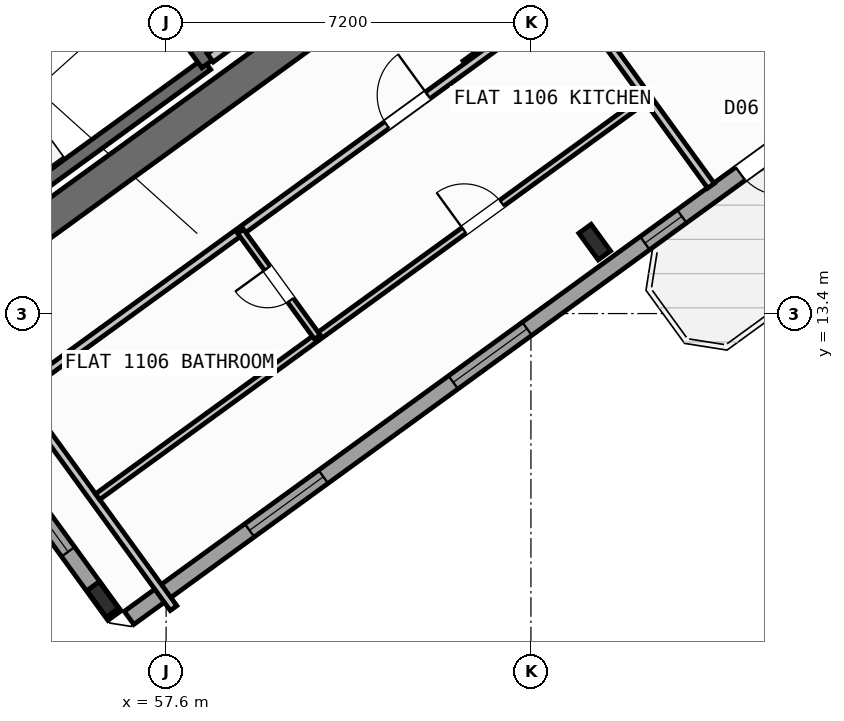
"""IFC4 building model, lengths in metres.
Left out: names, types, materials, properties, quantities, classifications, styles, units other than length and angle.
Written with IfcOpenShell. Run it as: python <this file> out.ifc"""

import sys

from ifc_helpers import new_model, si_unit, direction, frame, frame_2d, origin, origin_2d, place, context, subcontext, project, spatial, rectangle, i_section, extrude, source, transform, mapped, element, fill, save


model = new_model("IFC4")
c1 = context("Model", 3, precision=1e-05, world=origin(), true_north=direction((0.0, 1.0)))
c2 = subcontext(c1, "Body", "Model", "MODEL_VIEW")
j1 = project(units=[si_unit("LENGTHUNIT", "METRE"), si_unit("PLANEANGLEUNIT", "RADIAN")], contexts=[c1])
p1 = place(None, origin())
s1 = spatial("IfcSite", under=j1, at=p1, CompositionType="ELEMENT")
p2 = place(p1, origin())
s2 = spatial("IfcBuilding", under=s1, at=p2, CompositionType="ELEMENT")
p3 = place(p2, frame((0.0, 0.0, 45.6)))
s3 = spatial("IfcBuildingStorey", under=s2, at=p3, CompositionType="ELEMENT", Elevation=45.6)
p4 = place(p3, frame((52.318, 13.11, 0.0), z_axis=(0.0, 0.0, 1.0), x_axis=(0.809019445368, 0.587781878776, 0.0)))
e1 = element("IfcWall", 1, at=p4, inside=s3, PredefinedType="SHEAR", context=c2, shape_type="SweptSolid", body=[
    extrude(rectangle(XDim=12.44, YDim=0.65, at=frame_2d((6.22, 0.0))), origin(), (0.0, 0.0, 1.0), 3.35),
])
m1 = source(origin(), c2, "Body", "SweptSolid", [
    extrude(i_section(OverallWidth=0.3, OverallDepth=0.65, WebThickness=0.016, FlangeThickness=0.031, at=origin_2d()), origin(), (0.0, 0.0, 1.0), 3.6),
])
for number, where, z_axis, x_axis in (
    (2, (56.35, 7.758, 0.0), (0.0, 0.0, 1.0), (0.809, 0.588, 0.0)),
    (3, (66.058, 14.811, 0.0), (0.0, 0.0, 1.0), (0.809, 0.588, 0.0)),
):
    element("IfcColumn", number, at=place(p3, frame(where, z_axis=z_axis, x_axis=x_axis)), inside=s3, PredefinedType="COLUMN", context=c2, shape_type="MappedRepresentation", body=[
        mapped(m1, transform((0.0, 0.0, 0.0), scale=1.0)),
    ])
p5 = place(p3, frame((58.455, 35.484, 0.0), z_axis=(0.0, 0.0, 1.0), x_axis=(0.587783625747, -0.809018176127, 0.0)))
e4 = element("IfcWall", 4, at=p5, inside=s3, PredefinedType="STANDARD", context=c2, shape_type="SweptSolid", body=[
    extrude(rectangle(XDim=21.587, YDim=0.32, at=frame_2d((10.794, 0.0))), origin(), (0.0, 0.0, 1.0), 2.725),
])
p6 = place(p5, frame((1.5, 0.0, 0.8)))
e5 = element("IfcOpeningElement", 5, at=p6, cuts=e4, PredefinedType="OPENING", context=c2, shape_type="SweptSolid", body=[
    extrude(rectangle(XDim=2.1, YDim=1.55, at=frame_2d((1.05, 0.775))), frame((0.0, 0.17, 0.0), z_axis=(0.0, -1.0, 0.0), x_axis=(1.0, 0.0, 0.0)), (0.0, 0.0, 1.0), 0.34),
])
p7 = place(p5, frame((5.105, 0.0, 0.85)))
e6 = element("IfcOpeningElement", 6, at=p7, cuts=e4, PredefinedType="OPENING", context=c2, shape_type="SweptSolid", body=[
    extrude(rectangle(XDim=1.5, YDim=1.5, at=frame_2d((0.75, 0.75))), frame((0.0, 0.17, 0.0), z_axis=(0.0, -1.0, 0.0), x_axis=(1.0, 0.0, 0.0)), (0.0, 0.0, 1.0), 0.34),
])
p8 = place(p5, frame((8.954, 0.0, 0.85)))
e7 = element("IfcOpeningElement", 7, at=p8, cuts=e4, PredefinedType="OPENING", context=c2, shape_type="SweptSolid", body=[
    extrude(rectangle(XDim=1.5, YDim=1.5, at=frame_2d((0.75, 0.75))), frame((0.0, 0.17, 0.0), z_axis=(0.0, -1.0, 0.0), x_axis=(1.0, 0.0, 0.0)), (0.0, 0.0, 1.0), 0.34),
])
p9 = place(p5, frame((17.581, 0.0, 0.95)))
e8 = element("IfcOpeningElement", 8, at=p9, cuts=e4, PredefinedType="OPENING", context=c2, shape_type="SweptSolid", body=[
    extrude(rectangle(XDim=1.2, YDim=1.4, at=frame_2d((0.6, 0.7))), frame((0.0, 0.17, 0.0), z_axis=(0.0, -1.0, 0.0), x_axis=(1.0, 0.0, 0.0)), (0.0, 0.0, 1.0), 0.34),
])
p10 = place(p3, frame((71.098, 17.731, 0.0), z_axis=(0.0, 0.0, 1.0), x_axis=(-0.809021120468, -0.587779573171, 0.0)))
e9 = element("IfcWall", 9, at=p10, inside=s3, PredefinedType="STANDARD", context=c2, shape_type="SweptSolid", body=[
    extrude(rectangle(XDim=17.588, YDim=0.32, at=frame_2d((8.794, 0.0))), origin(), (0.0, 0.0, 1.0), 3.35),
])
p11 = place(p10, frame((1.624, 0.0, 0.0)))
e10 = element("IfcOpeningElement", 10, at=p11, cuts=e9, PredefinedType="OPENING", context=c2, shape_type="SweptSolid", body=[
    extrude(rectangle(XDim=1.05, YDim=2.15, at=frame_2d((0.525, 1.075))), frame((0.0, 0.17, 0.0), z_axis=(0.0, -1.0, 0.0), x_axis=(1.0, 0.0, 0.0)), (0.0, 0.0, 1.0), 0.34),
])
p12 = place(p10, frame((4.104, 0.0, 1.0)))
e11 = element("IfcOpeningElement", 11, at=p12, cuts=e9, PredefinedType="OPENING", context=c2, shape_type="SweptSolid", body=[
    extrude(rectangle(XDim=0.9, YDim=1.25, at=frame_2d((0.45, 0.625))), frame((0.0, 0.17, 0.0), z_axis=(0.0, -1.0, 0.0), x_axis=(1.0, 0.0, 0.0)), (0.0, 0.0, 1.0), 0.34),
])
p13 = place(p10, frame((7.879, 0.0, 0.85)))
e12 = element("IfcOpeningElement", 12, at=p13, cuts=e9, PredefinedType="OPENING", context=c2, shape_type="SweptSolid", body=[
    extrude(rectangle(XDim=1.8, YDim=1.5, at=frame_2d((0.9, 0.75))), frame((0.0, 0.17, 0.0), z_axis=(0.0, -1.0, 0.0), x_axis=(1.0, 0.0, 0.0)), (0.0, 0.0, 1.0), 0.34),
])
p14 = place(p10, frame((12.849, 0.0, 0.85)))
e13 = element("IfcOpeningElement", 13, at=p14, cuts=e9, PredefinedType="OPENING", context=c2, shape_type="SweptSolid", body=[
    extrude(rectangle(XDim=1.8, YDim=1.5, at=frame_2d((0.9, 0.75))), frame((0.0, 0.17, 0.0), z_axis=(0.0, -1.0, 0.0), x_axis=(1.0, 0.0, 0.0)), (0.0, 0.0, 1.0), 0.34),
])
p15 = place(p3, frame((56.581, 7.439, 0.0), z_axis=(0.0, 0.0, 1.0), x_axis=(-0.587785875463, 0.809016541614, 0.0)))
e14 = element("IfcWall", 14, at=p15, inside=s3, PredefinedType="STANDARD", context=c2, shape_type="SweptSolid", body=[
    extrude(rectangle(XDim=6.774, YDim=0.32, at=frame_2d((3.387, 0.0))), origin(), (0.0, 0.0, 1.0), 2.725),
])
p16 = place(p15, frame((1.556, 0.0, 0.8)))
e15 = element("IfcOpeningElement", 15, at=p16, cuts=e14, PredefinedType="OPENING", context=c2, shape_type="SweptSolid", body=[
    extrude(rectangle(XDim=2.1, YDim=1.55, at=frame_2d((1.05, 0.775))), frame((0.0, 0.17, 0.0), z_axis=(0.0, -1.0, 0.0), x_axis=(1.0, 0.0, 0.0)), (0.0, 0.0, 1.0), 0.34),
])
p17 = place(p3, frame((52.472, 14.013, 0.0), z_axis=(0.0, 0.0, 1.0), x_axis=(0.809028366311, 0.587769599847, 0.0)))
e16 = element("IfcWall", 16, at=p17, inside=s3, PredefinedType="SHEAR", context=c2, shape_type="SweptSolid", body=[
    extrude(rectangle(XDim=7.33, YDim=0.26, at=frame_2d((3.665, 0.0))), origin(), (0.0, 0.0, 1.0), 3.35),
])
p18 = place(p3, frame((50.615, 16.57, 0.0), z_axis=(0.0, 0.0, 1.0), x_axis=(0.809028366311, 0.587769599847, 0.0)))
e17 = element("IfcWall", 17, at=p18, inside=s3, PredefinedType="SHEAR", context=c2, shape_type="SweptSolid", body=[
    extrude(rectangle(XDim=7.33, YDim=0.26, at=frame_2d((3.665, 0.0))), origin(), (0.0, 0.0, 1.0), 3.35),
])
p19 = place(p18, frame((0.22, 0.0, 0.0)))
e18 = element("IfcOpeningElement", 18, at=p19, cuts=e17, PredefinedType="OPENING", context=c2, shape_type="SweptSolid", body=[
    extrude(rectangle(XDim=1.1, YDim=2.1, at=frame_2d((0.55, 1.05))), frame((0.0, 0.14, 0.0), z_axis=(0.0, -1.0, 0.0), x_axis=(1.0, 0.0, 0.0)), (0.0, 0.0, 1.0), 0.28),
])
p20 = place(p3, frame((58.41, 18.327, 0.0), z_axis=(0.0, 0.0, 1.0), x_axis=(-0.58776738483, 0.809029975545, 0.0)))
e19 = element("IfcWall", 19, at=p20, inside=s3, PredefinedType="SHEAR", context=c2, shape_type="SweptSolid", body=[
    extrude(rectangle(XDim=3.16, YDim=0.26, at=frame_2d((1.58, 0.0))), origin(), (0.0, 0.0, 1.0), 3.35),
])
p21 = place(p3, frame((58.472, 18.447, 0.0), z_axis=(0.0, 0.0, 1.0), x_axis=(0.809022487728, 0.587777691266, 0.0)))
e20 = element("IfcWall", 20, at=p21, inside=s3, PredefinedType="STANDARD", context=c2, shape_type="SweptSolid", body=[
    extrude(rectangle(XDim=3.648, YDim=0.2, at=frame_2d((1.824, 0.0))), origin(), (0.0, 0.0, 1.0), 3.34),
])
p22 = place(p3, frame((63.507, 18.322, 0.0), z_axis=(0.0, 0.0, 1.0), x_axis=(0.809034604122, 0.587761013791, 0.0)))
e21 = element("IfcWall", 21, at=p22, inside=s3, PredefinedType="PARTITIONING", context=c2, shape_type="SweptSolid", body=[
    extrude(rectangle(XDim=2.51, YDim=0.16, at=frame_2d((1.255, 0.0))), origin(), (0.0, 0.0, 1.0), 3.34),
])
p23 = place(p3, frame((68.353, 15.922, 0.0), z_axis=(0.0, 0.0, 1.0), x_axis=(-0.58776839458, 0.809029241952, 0.0)))
e22 = element("IfcWall", 22, at=p23, inside=s3, PredefinedType="PARTITIONING", context=c2, shape_type="SweptSolid", body=[
    extrude(rectangle(XDim=8.1, YDim=0.16, at=frame_2d((4.05, 0.0))), origin(), (0.0, 0.0, 1.0), 3.34),
])
p24 = place(p3, frame((53.705, 11.126, 0.0), z_axis=(0.0, 0.0, 1.0), x_axis=(0.809014504436, 0.587788679384, 0.0)))
e23 = element("IfcWall", 23, at=p24, inside=s3, PredefinedType="PARTITIONING", context=c2, shape_type="SweptSolid", body=[
    extrude(rectangle(XDim=14.67, YDim=0.16, at=frame_2d((7.335, 0.0))), origin(), (0.0, 0.0, 1.0), 3.34),
])
p25 = place(p24, frame((10.2, 0.0, 0.0)))
e24 = element("IfcOpeningElement", 24, at=p25, cuts=e23, PredefinedType="OPENING", context=c2, shape_type="SweptSolid", body=[
    extrude(rectangle(XDim=1.0, YDim=2.1, at=frame_2d((0.5, 1.05))), frame((0.0, 0.09, 0.0), z_axis=(0.0, -1.0, 0.0), x_axis=(1.0, 0.0, 0.0)), (0.0, 0.0, 1.0), 0.18),
])
p26 = place(p3, frame((57.747, 7.586, 0.0), z_axis=(0.0, 0.0, 1.0), x_axis=(-0.587784893399, 0.809017255126, 0.0)))
e25 = element("IfcWall", 25, at=p26, inside=s3, PredefinedType="PARTITIONING", context=c2, shape_type="SweptSolid", body=[
    extrude(rectangle(XDim=5.48, YDim=0.16, at=frame_2d((2.74, 0.0))), origin(), (0.0, 0.0, 1.0), 3.34),
])
p27 = place(p3, frame((56.249, 9.785, 0.0), z_axis=(0.0, 0.0, 1.0), x_axis=(0.809011747655, 0.587792473715, 0.0)))
e26 = element("IfcWall", 26, at=p27, inside=s3, PredefinedType="PLUMBINGWALL", context=c2, shape_type="SweptSolid", body=[
    extrude(rectangle(XDim=13.4, YDim=0.14, at=frame_2d((6.7, 0.0))), origin(), (0.0, 0.0, 1.0), 3.34),
])
p28 = place(p27, frame((8.94, 0.0, 0.0)))
e27 = element("IfcOpeningElement", 27, at=p28, cuts=e26, PredefinedType="OPENING", context=c2, shape_type="SweptSolid", body=[
    extrude(rectangle(XDim=0.92, YDim=2.08, at=frame_2d((0.46, 1.04))), frame((0.0, 0.08, 0.0), z_axis=(0.0, -1.0, 0.0), x_axis=(1.0, 0.0, 0.0)), (0.0, 0.0, 1.0), 0.16),
])
p29 = place(p3, frame((60.585, 12.936, 0.0), z_axis=(0.0, 0.0, 1.0), x_axis=(-0.587772116736, 0.809026537752, 0.0)))
e28 = element("IfcWall", 28, at=p29, inside=s3, PredefinedType="PLUMBINGWALL", context=c2, shape_type="SweptSolid", body=[
    extrude(rectangle(XDim=2.58, YDim=0.14, at=frame_2d((1.29, 0.0))), origin(), (0.0, 0.0, 1.0), 3.34),
])
p30 = place(p29, frame((0.9, 0.0, 0.0)))
e29 = element("IfcOpeningElement", 29, at=p30, cuts=e28, PredefinedType="OPENING", context=c2, shape_type="SweptSolid", body=[
    extrude(rectangle(XDim=0.78, YDim=2.05, at=frame_2d((0.39, 1.025))), frame((0.0, 0.08, 0.0), z_axis=(0.0, -1.0, 0.0), x_axis=(1.0, 0.0, 0.0)), (0.0, 0.0, 1.0), 0.16),
])
m2 = source(origin(), c2, "Body", "SweptSolid", [
    extrude(rectangle(XDim=1.05, YDim=2.15, at=frame_2d((0.525, 1.075))), frame((0.0, 0.025, 0.0), z_axis=(0.0, -1.0, 0.0), x_axis=(1.0, 0.0, 0.0)), (0.0, 0.0, 1.0), 0.05),
])
p31 = place(p11, origin())
e30 = element("IfcDoor", 30, at=p31, inside=s3, OperationType="SINGLE_SWING_LEFT", PredefinedType="DOOR", context=c2, shape_type="MappedRepresentation", body=[
    mapped(m2, transform((0.0, 0.0, 0.0), scale=1.0)),
])
fill(e10, e30)
m3 = source(origin(), c2, "Body", "SweptSolid", [
    extrude(rectangle(XDim=0.9, YDim=1.25, at=frame_2d((0.45, 0.625))), frame((0.0, 0.03, 0.0), z_axis=(0.0, -1.0, 0.0), x_axis=(1.0, 0.0, 0.0)), (0.0, 0.0, 1.0), 0.06),
])
p32 = place(p12, origin())
e31 = element("IfcWindow", 31, at=p32, inside=s3, PartitioningType="SINGLE_PANEL", PredefinedType="WINDOW", context=c2, shape_type="MappedRepresentation", body=[
    mapped(m3, transform((0.0, 0.0, 0.0), scale=1.0)),
])
fill(e11, e31)
m4 = source(origin(), c2, "Body", "SweptSolid", [
    extrude(rectangle(XDim=1.8, YDim=1.5, at=frame_2d((0.9, 0.75))), frame((0.0, 0.03, 0.0), z_axis=(0.0, -1.0, 0.0), x_axis=(1.0, 0.0, 0.0)), (0.0, 0.0, 1.0), 0.06),
])
p33 = place(p13, origin())
e32 = element("IfcWindow", 32, at=p33, inside=s3, PartitioningType="SINGLE_PANEL", PredefinedType="WINDOW", context=c2, shape_type="MappedRepresentation", body=[
    mapped(m4, transform((0.0, 0.0, 0.0), scale=1.0)),
])
fill(e12, e32)
p34 = place(p14, origin())
e33 = element("IfcWindow", 33, at=p34, inside=s3, PartitioningType="SINGLE_PANEL", PredefinedType="WINDOW", context=c2, shape_type="MappedRepresentation", body=[
    mapped(m4, transform((0.0, 0.0, 0.0), scale=1.0)),
])
fill(e13, e33)
m5 = source(origin(), c2, "Body", "SweptSolid", [
    extrude(rectangle(XDim=2.1, YDim=1.55, at=frame_2d((1.05, 0.775))), frame((0.0, 0.03, 0.0), z_axis=(0.0, -1.0, 0.0), x_axis=(1.0, 0.0, 0.0)), (0.0, 0.0, 1.0), 0.06),
])
p35 = place(p16, origin())
e34 = element("IfcWindow", 34, at=p35, inside=s3, PartitioningType="SINGLE_PANEL", PredefinedType="WINDOW", context=c2, shape_type="MappedRepresentation", body=[
    mapped(m5, transform((0.0, 0.0, 0.0), scale=1.0)),
])
fill(e15, e34)
m6 = source(origin(), c2, "Body", "SweptSolid", [
    extrude(rectangle(XDim=1.0, YDim=2.1, at=frame_2d((0.5, 1.05))), frame((0.0, 0.025, 0.0), z_axis=(0.0, -1.0, 0.0), x_axis=(1.0, 0.0, 0.0)), (0.0, 0.0, 1.0), 0.05),
])
p36 = place(p25, origin())
e35 = element("IfcDoor", 35, at=p36, inside=s3, OperationType="SINGLE_SWING_RIGHT", PredefinedType="DOOR", context=c2, shape_type="MappedRepresentation", body=[
    mapped(m6, transform((0.0, 0.0, 0.0), scale=1.0)),
])
fill(e24, e35)
m7 = source(origin(), c2, "Body", "SweptSolid", [
    extrude(rectangle(XDim=0.92, YDim=2.08, at=frame_2d((0.46, 1.04))), frame((0.0, 0.025, 0.0), z_axis=(0.0, -1.0, 0.0), x_axis=(1.0, 0.0, 0.0)), (0.0, 0.0, 1.0), 0.05),
])
p37 = place(p28, origin())
e36 = element("IfcDoor", 36, at=p37, inside=s3, OperationType="SINGLE_SWING_LEFT", PredefinedType="DOOR", context=c2, shape_type="MappedRepresentation", body=[
    mapped(m7, transform((0.0, 0.0, 0.0), scale=1.0)),
])
fill(e27, e36)
m8 = source(origin(), c2, "Body", "SweptSolid", [
    extrude(rectangle(XDim=0.78, YDim=2.05, at=frame_2d((0.39, 1.025))), frame((0.0, 0.025, 0.0), z_axis=(0.0, -1.0, 0.0), x_axis=(1.0, 0.0, 0.0)), (0.0, 0.0, 1.0), 0.05),
])
p38 = place(p30, origin())
e37 = element("IfcDoor", 37, at=p38, inside=s3, OperationType="SINGLE_SWING_RIGHT", PredefinedType="DOOR", context=c2, shape_type="MappedRepresentation", body=[
    mapped(m8, transform((0.0, 0.0, 0.0), scale=1.0)),
])
fill(e29, e37)
save(model, sys.argv[1])
